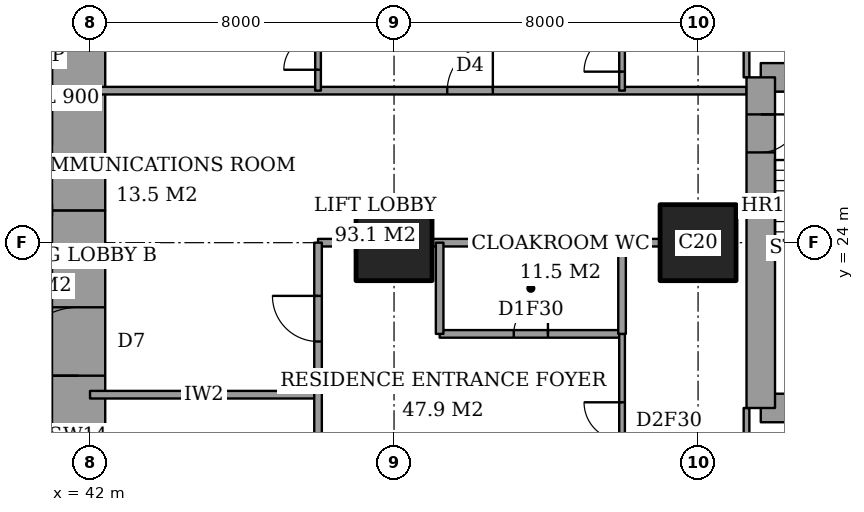
"""IFC4 building model, lengths in metres.
Left out: names, types, materials, properties, quantities, classifications, styles, units other than length and angle.
Written with IfcOpenShell. Run it as: python <this file> out.ifc"""

import sys

from ifc_helpers import new_model, si_unit, direction, frame, frame_2d, origin, origin_2d, place, context, subcontext, project, spatial, rectangle, extrude, element, fill, save


model = new_model("IFC4")
c1 = context("Model", 3, precision=1e-05, world=origin(), true_north=direction((0.0, 1.0)))
c2 = subcontext(c1, "Body", "Model", "MODEL_VIEW")
j1 = project(units=[si_unit("LENGTHUNIT", "METRE"), si_unit("PLANEANGLEUNIT", "RADIAN")], contexts=[c1])
p1 = place(None, origin())
s1 = spatial("IfcSite", under=j1, at=p1, CompositionType="ELEMENT")
p2 = place(p1, origin())
s2 = spatial("IfcBuilding", under=s1, at=p2, CompositionType="ELEMENT")
p3 = place(p2, frame((0.0, 0.0, 83.6)))
s3 = spatial("IfcBuildingStorey", under=s2, at=p3, CompositionType="ELEMENT", Elevation=83.6)
for number, where, z_axis, x_axis in (
    (1, (50.0, 24.0, 0.0), (0.0, 0.0, 1.0), (1.0, 0.0, 0.0)),
    (2, (58.0, 24.0, 0.0), (0.0, 0.0, 1.0), (1.0, 0.0, 0.0)),
):
    element("IfcColumn", number, at=place(p3, frame(where, z_axis=z_axis, x_axis=x_axis)), inside=s3, PredefinedType="COLUMN", context=c2, shape_type="SweptSolid", body=[
        extrude(rectangle(XDim=2.0, YDim=2.0, at=origin_2d()), origin(), (0.0, 0.0, 1.0), 3.6),
    ])
p4 = place(p3, frame((41.7, 13.0, 0.0), z_axis=(0.0, 0.0, 1.0), x_axis=(0.0, 1.0, 0.0)))
e3 = element("IfcWall", 3, at=p4, inside=s3, PredefinedType="SHEAR", context=c2, shape_type="SweptSolid", body=[
    extrude(rectangle(XDim=11.85, YDim=1.4, at=frame_2d((5.925, 0.0))), origin(), (0.0, 0.0, 1.0), 3.6),
])
p5 = place(p4, frame((7.5, 0.0, 0.0)))
e4 = element("IfcOpeningElement", 4, at=p5, cuts=e3, PredefinedType="OPENING", context=c2, shape_type="SweptSolid", body=[
    extrude(rectangle(XDim=1.8, YDim=2.4, at=frame_2d((0.9, 1.2))), frame((0.0, 0.71, 0.0), z_axis=(0.0, -1.0, 0.0), x_axis=(1.0, 0.0, 0.0)), (0.0, 0.0, 1.0), 1.42),
])
p6 = place(p3, frame((41.7, 24.85, 0.0), z_axis=(0.0, 0.0, 1.0), x_axis=(0.0, 1.0, 0.0)))
e5 = element("IfcWall", 5, at=p6, inside=s3, PredefinedType="SHEAR", context=c2, shape_type="SweptSolid", body=[
    extrude(rectangle(XDim=10.15, YDim=1.4, at=frame_2d((5.075, 0.0))), origin(), (0.0, 0.0, 1.0), 3.6),
])
for number, where, z_axis, x_axis in (
    (6, (59.65, 19.65, 0.0), (0.0, 0.0, 1.0), (1.0, 0.0, 0.0)),
    (7, (64.1, 28.35, 0.0), (0.0, 0.0, 1.0), (-1.0, 0.0, 0.0)),
):
    element("IfcWall", number, at=place(p3, frame(where, z_axis=z_axis, x_axis=x_axis)), inside=s3, PredefinedType="SHEAR", context=c2, shape_type="SweptSolid", body=[
        extrude(rectangle(XDim=4.45, YDim=0.75, at=frame_2d((2.225, 0.0))), origin(), (0.0, 0.0, 1.0), 3.6),
    ])
p7 = place(p3, frame((59.65, 28.35, 0.0), z_axis=(0.0, 0.0, 1.0), x_axis=(0.0, -1.0, 0.0)))
e8 = element("IfcWall", 8, at=p7, inside=s3, PredefinedType="SHEAR", context=c2, shape_type="SweptSolid", body=[
    extrude(rectangle(XDim=8.7, YDim=0.75, at=frame_2d((4.35, 0.0))), origin(), (0.0, 0.0, 1.0), 3.6),
])
p8 = place(p7, frame((0.975, 0.0, 0.0)))
e9 = element("IfcOpeningElement", 9, at=p8, cuts=e8, PredefinedType="OPENING", context=c2, shape_type="SweptSolid", body=[
    extrude(rectangle(XDim=1.0, YDim=2.1, at=frame_2d((0.5, 1.05))), frame((0.0, 0.385, 0.0), z_axis=(0.0, -1.0, 0.0), x_axis=(1.0, 0.0, 0.0)), (0.0, 0.0, 1.0), 0.77),
])
p9 = place(p3, frame((42.0, 20.0, 0.0), z_axis=(0.0, 0.0, 1.0), x_axis=(1.0, 0.0, 0.0)))
e10 = element("IfcWall", 10, at=p9, inside=s3, PredefinedType="PARTITIONING", context=c2, shape_type="SweptSolid", body=[
    extrude(rectangle(XDim=6.0, YDim=0.2, at=frame_2d((3.0, 0.0))), origin(), (0.0, 0.0, 1.0), 3.35),
])
p10 = place(p3, frame((51.2, 21.6, 0.0), z_axis=(0.0, 0.0, 1.0), x_axis=(1.0, 0.0, 0.0)))
e11 = element("IfcWall", 11, at=p10, inside=s3, PredefinedType="PARTITIONING", context=c2, shape_type="SweptSolid", body=[
    extrude(rectangle(XDim=4.8, YDim=0.2, at=frame_2d((2.4, 0.0))), origin(), (0.0, 0.0, 1.0), 3.35),
])
p11 = place(p10, frame((1.95, 0.0, 0.0)))
e12 = element("IfcOpeningElement", 12, at=p11, cuts=e11, PredefinedType="OPENING", context=c2, shape_type="SweptSolid", body=[
    extrude(rectangle(XDim=0.9, YDim=2.1, at=frame_2d((0.45, 1.05))), frame((0.0, 0.11, 0.0), z_axis=(0.0, -1.0, 0.0), x_axis=(1.0, 0.0, 0.0)), (0.0, 0.0, 1.0), 0.22),
])
p12 = place(p3, frame((48.0, 24.0, 0.0), z_axis=(0.0, 0.0, 1.0), x_axis=(1.0, 0.0, 0.0)))
e13 = element("IfcWall", 13, at=p12, inside=s3, PredefinedType="PARTITIONING", context=c2, shape_type="SweptSolid", body=[
    extrude(rectangle(XDim=1.0, YDim=0.2, at=frame_2d((0.5, 0.0))), origin(), (0.0, 0.0, 1.0), 3.35),
])
p13 = place(p3, frame((51.0, 24.0, 0.0), z_axis=(0.0, 0.0, 1.0), x_axis=(1.0, 0.0, 0.0)))
e14 = element("IfcWall", 14, at=p13, inside=s3, PredefinedType="PARTITIONING", context=c2, shape_type="SweptSolid", body=[
    extrude(rectangle(XDim=6.0, YDim=0.2, at=frame_2d((3.0, 0.0))), origin(), (0.0, 0.0, 1.0), 3.35),
])
p14 = place(p3, frame((42.0, 28.0, 0.0), z_axis=(0.0, 0.0, 1.0), x_axis=(1.0, 0.0, 0.0)))
e15 = element("IfcWall", 15, at=p14, inside=s3, PredefinedType="PARTITIONING", context=c2, shape_type="SweptSolid", body=[
    extrude(rectangle(XDim=17.275, YDim=0.2, at=frame_2d((8.637, 0.0))), origin(), (0.0, 0.0, 1.0), 3.35),
])
p15 = place(p14, frame((9.4, 0.0, 0.0)))
e16 = element("IfcOpeningElement", 16, at=p15, cuts=e15, PredefinedType="OPENING", context=c2, shape_type="SweptSolid", body=[
    extrude(rectangle(XDim=1.2, YDim=2.4, at=frame_2d((0.6, 1.2))), frame((0.0, 0.11, 0.0), z_axis=(0.0, -1.0, 0.0), x_axis=(1.0, 0.0, 0.0)), (0.0, 0.0, 1.0), 0.22),
])
p16 = place(p3, frame((48.0, 17.0, 0.0), z_axis=(0.0, 0.0, 1.0), x_axis=(0.0, 1.0, 0.0)))
e17 = element("IfcWall", 17, at=p16, inside=s3, PredefinedType="PARTITIONING", context=c2, shape_type="SweptSolid", body=[
    extrude(rectangle(XDim=7.0, YDim=0.2, at=frame_2d((3.5, 0.0))), origin(), (0.0, 0.0, 1.0), 3.35),
])
p17 = place(p16, frame((4.4, 0.0, 0.0)))
e18 = element("IfcOpeningElement", 18, at=p17, cuts=e17, PredefinedType="OPENING", context=c2, shape_type="SweptSolid", body=[
    extrude(rectangle(XDim=1.2, YDim=2.4, at=frame_2d((0.6, 1.2))), frame((0.0, 0.11, 0.0), z_axis=(0.0, -1.0, 0.0), x_axis=(1.0, 0.0, 0.0)), (0.0, 0.0, 1.0), 0.22),
])
p18 = place(p16, frame((1.05, 0.0, 0.0)))
e19 = element("IfcOpeningElement", 19, at=p18, cuts=e17, PredefinedType="OPENING", context=c2, shape_type="SweptSolid", body=[
    extrude(rectangle(XDim=0.9, YDim=2.1, at=frame_2d((0.45, 1.05))), frame((0.0, 0.11, 0.0), z_axis=(0.0, -1.0, 0.0), x_axis=(1.0, 0.0, 0.0)), (0.0, 0.0, 1.0), 0.22),
])
p19 = place(p3, frame((48.0, 28.0, 0.0), z_axis=(0.0, 0.0, 1.0), x_axis=(0.0, 1.0, 0.0)))
e20 = element("IfcWall", 20, at=p19, inside=s3, PredefinedType="PARTITIONING", context=c2, shape_type="SweptSolid", body=[
    extrude(rectangle(XDim=9.4, YDim=0.15, at=frame_2d((4.7, 0.0))), origin(), (0.0, 0.0, 1.0), 3.35),
])
p20 = place(p19, frame((0.55, 0.0, 0.0)))
e21 = element("IfcOpeningElement", 21, at=p20, cuts=e20, PredefinedType="OPENING", context=c2, shape_type="SweptSolid", body=[
    extrude(rectangle(XDim=0.9, YDim=2.1, at=frame_2d((0.45, 1.05))), frame((0.0, 0.085, 0.0), z_axis=(0.0, -1.0, 0.0), x_axis=(1.0, 0.0, 0.0)), (0.0, 0.0, 1.0), 0.17),
])
for number, where, z_axis, x_axis in (
    (22, (51.2, 21.6, 0.0), (0.0, 0.0, 1.0), (0.0, 1.0, 0.0)),
    (23, (56.0, 21.6, 0.0), (0.0, 0.0, 1.0), (0.0, 1.0, 0.0)),
):
    element("IfcWall", number, at=place(p3, frame(where, z_axis=z_axis, x_axis=x_axis)), inside=s3, PredefinedType="PARTITIONING", context=c2, shape_type="SweptSolid", body=[
        extrude(rectangle(XDim=2.4, YDim=0.2, at=frame_2d((1.2, 0.0))), origin(), (0.0, 0.0, 1.0), 3.35),
    ])
p21 = place(p3, frame((56.0, 10.6, 0.0), z_axis=(0.0, 0.0, 1.0), x_axis=(0.0, 1.0, 0.0)))
e24 = element("IfcWall", 24, at=p21, inside=s3, PredefinedType="PARTITIONING", context=c2, shape_type="SweptSolid", body=[
    extrude(rectangle(XDim=11.0, YDim=0.15, at=frame_2d((5.5, 0.0))), origin(), (0.0, 0.0, 1.0), 3.35),
])
p22 = place(p21, frame((8.2, 0.0, 0.0)))
e25 = element("IfcOpeningElement", 25, at=p22, cuts=e24, PredefinedType="OPENING", context=c2, shape_type="SweptSolid", body=[
    extrude(rectangle(XDim=1.0, YDim=2.1, at=frame_2d((0.5, 1.05))), frame((0.0, 0.085, 0.0), z_axis=(0.0, -1.0, 0.0), x_axis=(1.0, 0.0, 0.0)), (0.0, 0.0, 1.0), 0.17),
])
p23 = place(p3, frame((56.0, 28.0, 0.0), z_axis=(0.0, 0.0, 1.0), x_axis=(0.0, 1.0, 0.0)))
e26 = element("IfcWall", 26, at=p23, inside=s3, PredefinedType="PARTITIONING", context=c2, shape_type="SweptSolid", body=[
    extrude(rectangle(XDim=9.4, YDim=0.15, at=frame_2d((4.7, 0.0))), origin(), (0.0, 0.0, 1.0), 3.35),
])
p24 = place(p23, frame((0.5, 0.0, 0.0)))
e27 = element("IfcOpeningElement", 27, at=p24, cuts=e26, PredefinedType="OPENING", context=c2, shape_type="SweptSolid", body=[
    extrude(rectangle(XDim=1.0, YDim=2.1, at=frame_2d((0.5, 1.05))), frame((0.0, 0.085, 0.0), z_axis=(0.0, -1.0, 0.0), x_axis=(1.0, 0.0, 0.0)), (0.0, 0.0, 1.0), 0.17),
])
p25 = place(p3, frame((59.275, 17.2, 0.0), z_axis=(0.0, 0.0, 1.0), x_axis=(0.0, 1.0, 0.0)))
e28 = element("IfcWall", 28, at=p25, inside=s3, PredefinedType="PARTITIONING", context=c2, shape_type="SweptSolid", body=[
    extrude(rectangle(XDim=2.45, YDim=0.15, at=frame_2d((1.225, 0.0))), origin(), (0.0, 0.0, 1.0), 3.35),
])
p26 = place(p25, frame((0.538, 0.0, 0.0)))
e29 = element("IfcOpeningElement", 29, at=p26, cuts=e28, PredefinedType="OPENING", context=c2, shape_type="SweptSolid", body=[
    extrude(rectangle(XDim=1.0, YDim=2.1, at=frame_2d((0.5, 1.05))), frame((0.0, 0.085, 0.0), z_axis=(0.0, -1.0, 0.0), x_axis=(1.0, 0.0, 0.0)), (0.0, 0.0, 1.0), 0.17),
])
p27 = place(p3, frame((59.275, 28.35, 0.0), z_axis=(0.0, 0.0, 1.0), x_axis=(0.0, 1.0, 0.0)))
e30 = element("IfcWall", 30, at=p27, inside=s3, PredefinedType="PARTITIONING", context=c2, shape_type="SweptSolid", body=[
    extrude(rectangle(XDim=2.45, YDim=0.15, at=frame_2d((1.225, 0.0))), origin(), (0.0, 0.0, 1.0), 3.35),
])
p28 = place(p27, frame((0.913, 0.0, 0.0)))
e31 = element("IfcOpeningElement", 31, at=p28, cuts=e30, PredefinedType="OPENING", context=c2, shape_type="SweptSolid", body=[
    extrude(rectangle(XDim=1.0, YDim=2.1, at=frame_2d((0.5, 1.05))), frame((0.0, 0.085, 0.0), z_axis=(0.0, -1.0, 0.0), x_axis=(1.0, 0.0, 0.0)), (0.0, 0.0, 1.0), 0.17),
])
p29 = place(p22, origin())
e32 = element("IfcDoor", 32, at=p29, inside=s3, OperationType="SINGLE_SWING_LEFT", PredefinedType="DOOR", context=c2, shape_type="SweptSolid", body=[
    extrude(rectangle(XDim=1.0, YDim=2.1, at=frame_2d((0.5, 1.05))), frame((0.0, 0.025, 0.0), z_axis=(0.0, -1.0, 0.0), x_axis=(1.0, 0.0, 0.0)), (0.0, 0.0, 1.0), 0.05),
])
fill(e25, e32)
p30 = place(p11, origin())
e33 = element("IfcDoor", 33, at=p30, inside=s3, OperationType="SINGLE_SWING_LEFT", PredefinedType="DOOR", context=c2, shape_type="SweptSolid", body=[
    extrude(rectangle(XDim=0.9, YDim=2.1, at=frame_2d((0.45, 1.05))), frame((0.0, 0.025, 0.0), z_axis=(0.0, -1.0, 0.0), x_axis=(1.0, 0.0, 0.0)), (0.0, 0.0, 1.0), 0.05),
])
fill(e12, e33)
p31 = place(p17, origin())
e34 = element("IfcDoor", 34, at=p31, inside=s3, OperationType="SINGLE_SWING_LEFT", PredefinedType="DOOR", context=c2, shape_type="SweptSolid", body=[
    extrude(rectangle(XDim=1.2, YDim=2.4, at=frame_2d((0.6, 1.2))), frame((0.0, 0.025, 0.0), z_axis=(0.0, -1.0, 0.0), x_axis=(1.0, 0.0, 0.0)), (0.0, 0.0, 1.0), 0.05),
])
fill(e18, e34)
p32 = place(p24, origin())
e35 = element("IfcDoor", 35, at=p32, inside=s3, OperationType="SINGLE_SWING_RIGHT", PredefinedType="DOOR", context=c2, shape_type="SweptSolid", body=[
    extrude(rectangle(XDim=1.0, YDim=2.1, at=frame_2d((0.5, 1.05))), frame((0.0, 0.025, 0.0), z_axis=(0.0, -1.0, 0.0), x_axis=(1.0, 0.0, 0.0)), (0.0, 0.0, 1.0), 0.05),
])
fill(e27, e35)
p33 = place(p15, origin())
e36 = element("IfcDoor", 36, at=p33, inside=s3, OperationType="SINGLE_SWING_LEFT", PredefinedType="DOOR", context=c2, shape_type="SweptSolid", body=[
    extrude(rectangle(XDim=1.2, YDim=2.4, at=frame_2d((0.6, 1.2))), frame((0.0, 0.025, 0.0), z_axis=(0.0, -1.0, 0.0), x_axis=(1.0, 0.0, 0.0)), (0.0, 0.0, 1.0), 0.05),
])
fill(e16, e36)
p34 = place(p20, origin())
e37 = element("IfcDoor", 37, at=p34, inside=s3, OperationType="SINGLE_SWING_RIGHT", PredefinedType="DOOR", context=c2, shape_type="SweptSolid", body=[
    extrude(rectangle(XDim=0.9, YDim=2.1, at=frame_2d((0.45, 1.05))), frame((0.0, 0.025, 0.0), z_axis=(0.0, -1.0, 0.0), x_axis=(1.0, 0.0, 0.0)), (0.0, 0.0, 1.0), 0.05),
])
fill(e21, e37)
p35 = place(p5, origin())
e38 = element("IfcDoor", 38, at=p35, inside=s3, OperationType="DOUBLE_DOOR_DOUBLE_SWING", PredefinedType="DOOR", context=c2, shape_type="SweptSolid", body=[
    extrude(rectangle(XDim=1.8, YDim=2.4, at=frame_2d((0.9, 1.2))), frame((0.0, 0.025, 0.0), z_axis=(0.0, -1.0, 0.0), x_axis=(1.0, 0.0, 0.0)), (0.0, 0.0, 1.0), 0.05),
])
fill(e4, e38)
p36 = place(p8, origin())
e39 = element("IfcDoor", 39, at=p36, inside=s3, OperationType="SINGLE_SWING_RIGHT", PredefinedType="DOOR", context=c2, shape_type="SweptSolid", body=[
    extrude(rectangle(XDim=1.0, YDim=2.1, at=frame_2d((0.5, 1.05))), frame((0.0, 0.025, 0.0), z_axis=(0.0, -1.0, 0.0), x_axis=(1.0, 0.0, 0.0)), (0.0, 0.0, 1.0), 0.05),
])
fill(e9, e39)
save(model, sys.argv[1])
